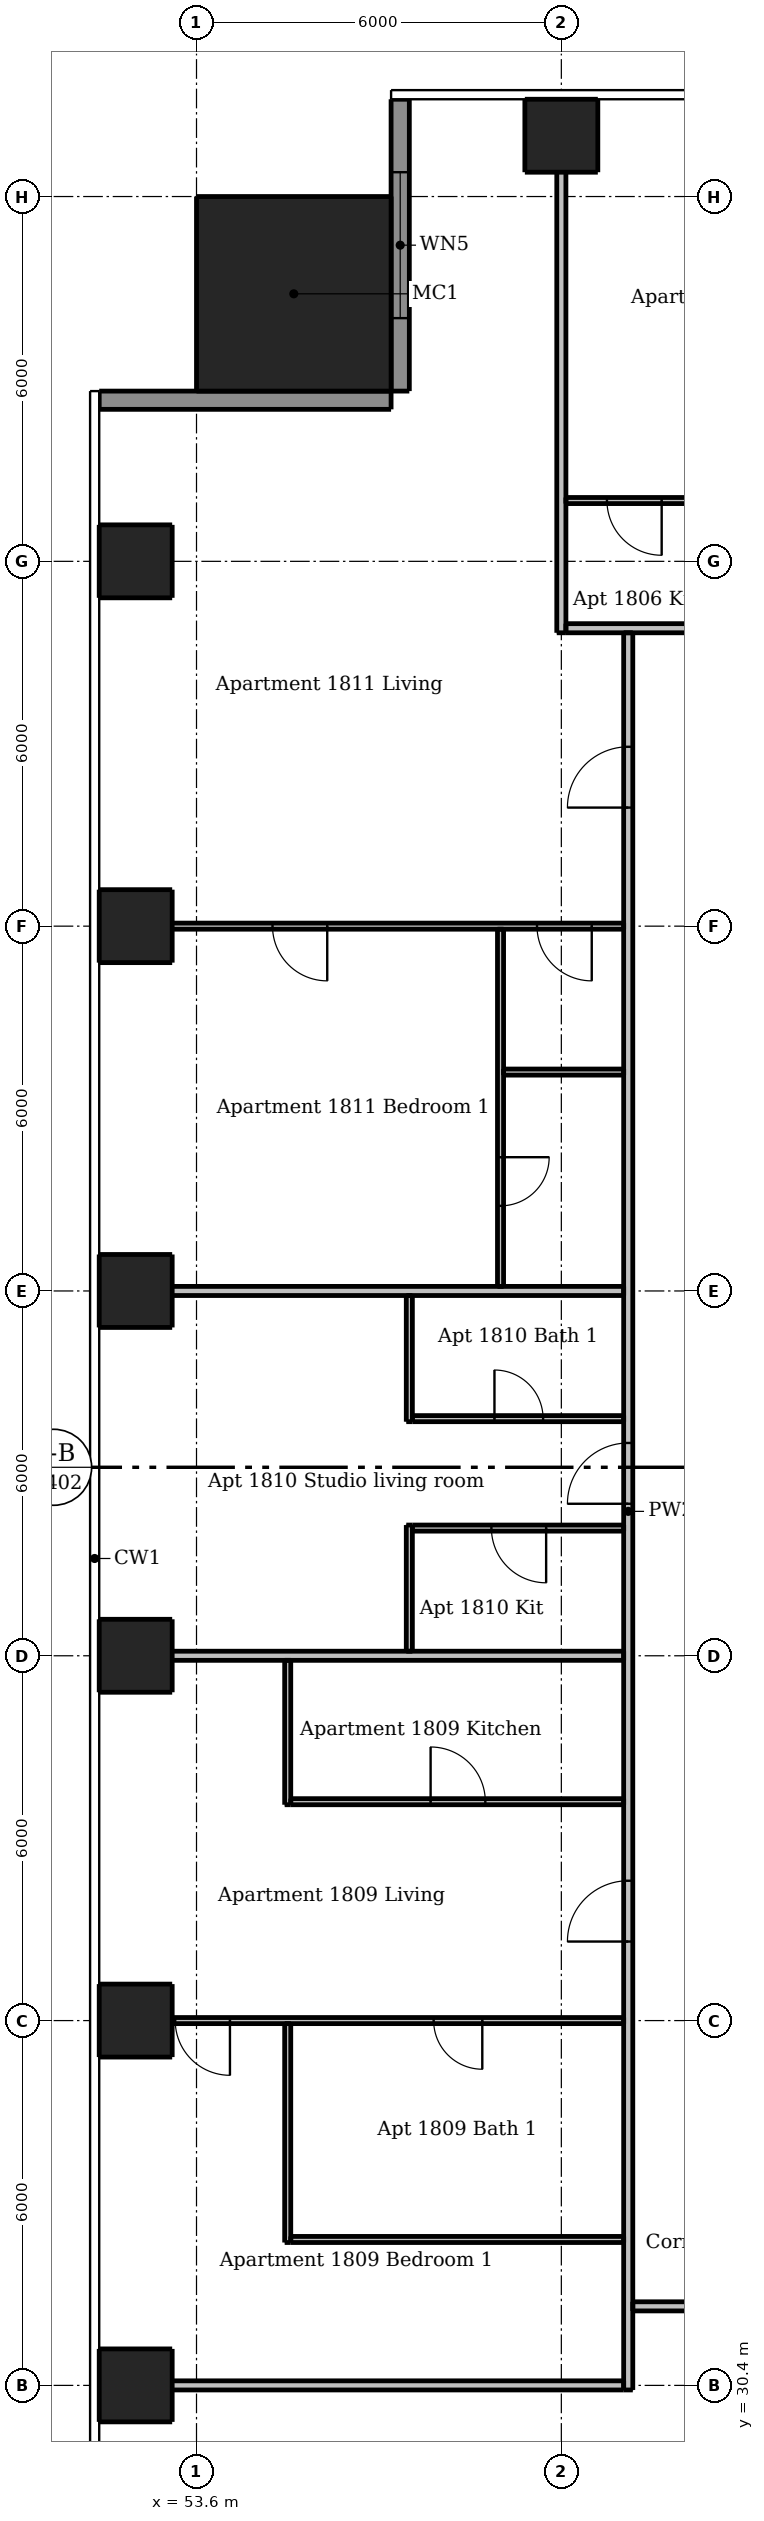
"""IFC4 building model, lengths in metres.
Left out: names, types, materials, properties, quantities, classifications, styles, units other than length and angle.
Written with IfcOpenShell. Run it as: python <this file> out.ifc"""

import sys

from ifc_helpers import new_model, si_unit, direction, frame, frame_2d, origin, origin_2d, place, context, subcontext, project, spatial, rectangle, extrude, element, fill, save


model = new_model("IFC4")
c1 = context("Model", 3, precision=1e-05, world=origin(), true_north=direction((0.0, 1.0)))
c2 = subcontext(c1, "Body", "Model", "MODEL_VIEW")
j1 = project(units=[si_unit("LENGTHUNIT", "METRE"), si_unit("PLANEANGLEUNIT", "RADIAN")], contexts=[c1])
p1 = place(None, origin())
s1 = spatial("IfcSite", under=j1, at=p1, CompositionType="ELEMENT")
p2 = place(p1, origin())
s2 = spatial("IfcBuilding", under=s1, at=p2, CompositionType="ELEMENT")
p3 = place(p2, frame((0.0, 0.0, 66.4)))
s3 = spatial("IfcBuildingStorey", under=s2, at=p3, CompositionType="ELEMENT", Elevation=66.4)
for number, where, z_axis, x_axis in (
    (1, (59.6, 67.4, 0.0), (0.0, 0.0, 1.0), (1.0, 0.0, 0.0)),
    (2, (52.6, 30.4, 0.0), (0.0, 0.0, 1.0), (1.0, 0.0, 0.0)),
    (3, (52.6, 36.4, 0.0), (0.0, 0.0, 1.0), (1.0, 0.0, 0.0)),
    (4, (52.6, 42.4, 0.0), (0.0, 0.0, 1.0), (1.0, 0.0, 0.0)),
    (5, (52.6, 48.4, 0.0), (0.0, 0.0, 1.0), (1.0, 0.0, 0.0)),
    (6, (52.6, 54.4, 0.0), (0.0, 0.0, 1.0), (1.0, 0.0, 0.0)),
    (7, (52.6, 60.4, 0.0), (0.0, 0.0, 1.0), (1.0, 0.0, 0.0)),
):
    element("IfcColumn", number, at=place(p3, frame(where, z_axis=z_axis, x_axis=x_axis)), inside=s3, PredefinedType="COLUMN", context=c2, shape_type="SweptSolid", body=[
        extrude(rectangle(XDim=1.2, YDim=1.2, at=origin_2d()), origin(), (0.0, 0.0, 1.0), 2.95),
    ])
p4 = place(p3, frame((55.2, 64.8, 0.0), z_axis=(0.0, 0.0, 1.0), x_axis=(1.0, 0.0, 0.0)))
e8 = element("IfcColumn", 8, at=p4, inside=s3, PredefinedType="COLUMN", context=c2, shape_type="SweptSolid", body=[
    extrude(rectangle(XDim=3.2, YDim=3.2, at=origin_2d()), origin(), (0.0, 0.0, 1.0), 3.3),
])
p5 = place(p3, frame((56.95, 68.0, 0.0), z_axis=(0.0, 0.0, 1.0), x_axis=(0.0, -1.0, 0.0)))
e9 = element("IfcWall", 9, at=p5, inside=s3, PredefinedType="SOLIDWALL", context=c2, shape_type="SweptSolid", body=[
    extrude(rectangle(XDim=4.8, YDim=0.3, at=frame_2d((2.4, 0.0))), origin(), (0.0, 0.0, 1.0), 2.95),
])
p6 = place(p5, frame((1.2, 0.0, 0.15)))
e10 = element("IfcOpeningElement", 10, at=p6, cuts=e9, PredefinedType="OPENING", context=c2, shape_type="SweptSolid", body=[
    extrude(rectangle(XDim=2.4, YDim=2.1, at=frame_2d((1.2, 1.05))), frame((0.0, 0.16, 0.0), z_axis=(0.0, -1.0, 0.0), x_axis=(1.0, 0.0, 0.0)), (0.0, 0.0, 1.0), 0.32),
])
p7 = place(p3, frame((56.8, 63.05, 0.0), z_axis=(0.0, 0.0, 1.0), x_axis=(-1.0, 0.0, 0.0)))
e11 = element("IfcWall", 11, at=p7, inside=s3, PredefinedType="SOLIDWALL", context=c2, shape_type="SweptSolid", body=[
    extrude(rectangle(XDim=4.8, YDim=0.3, at=frame_2d((2.4, 0.0))), origin(), (0.0, 0.0, 1.0), 2.95),
])
p8 = place(p3, frame((55.1, 32.75, 0.0), z_axis=(0.0, 0.0, 1.0), x_axis=(0.0, 1.0, 0.0)))
e12 = element("IfcWall", 12, at=p8, inside=s3, PredefinedType="PARTITIONING", context=c2, shape_type="SweptSolid", body=[
    extrude(rectangle(XDim=3.6, YDim=0.1, at=frame_2d((1.8, 0.0))), origin(), (0.0, 0.0, 1.0), 2.95),
])
p9 = place(p3, frame((55.1, 39.95, 0.0), z_axis=(0.0, 0.0, 1.0), x_axis=(0.0, 1.0, 0.0)))
e13 = element("IfcWall", 13, at=p9, inside=s3, PredefinedType="PARTITIONING", context=c2, shape_type="SweptSolid", body=[
    extrude(rectangle(XDim=2.375, YDim=0.1, at=frame_2d((1.188, 0.0))), origin(), (0.0, 0.0, 1.0), 2.95),
])
for number, where, z_axis, x_axis in (
    (14, (57.1, 42.475, 0.0), (0.0, 0.0, 1.0), (0.0, 1.0, 0.0)),
    (15, (57.1, 46.25, 0.0), (0.0, 0.0, 1.0), (0.0, 1.0, 0.0)),
):
    element("IfcWall", number, at=place(p3, frame(where, z_axis=z_axis, x_axis=x_axis)), inside=s3, PredefinedType="PARTITIONING", context=c2, shape_type="SweptSolid", body=[
        extrude(rectangle(XDim=2.075, YDim=0.1, at=frame_2d((1.038, 0.0))), origin(), (0.0, 0.0, 1.0), 2.95),
    ])
p10 = place(p3, frame((58.6, 54.35, 0.0), z_axis=(0.0, 0.0, 1.0), x_axis=(0.0, -1.0, 0.0)))
e16 = element("IfcWall", 16, at=p10, inside=s3, PredefinedType="PARTITIONING", context=c2, shape_type="SweptSolid", body=[
    extrude(rectangle(XDim=5.875, YDim=0.1, at=frame_2d((2.938, 0.0))), origin(), (0.0, 0.0, 1.0), 2.95),
])
p11 = place(p10, frame((3.75, 0.0, 0.0)))
e17 = element("IfcOpeningElement", 17, at=p11, cuts=e16, PredefinedType="OPENING", context=c2, shape_type="SweptSolid", body=[
    extrude(rectangle(XDim=0.8, YDim=2.1, at=frame_2d((0.4, 1.05))), frame((0.0, 0.06, 0.0), z_axis=(0.0, -1.0, 0.0), x_axis=(1.0, 0.0, 0.0)), (0.0, 0.0, 1.0), 0.12),
])
p12 = place(p3, frame((61.95, 61.4, 0.0), z_axis=(0.0, 0.0, 1.0), x_axis=(-1.0, 0.0, 0.0)))
e18 = element("IfcWall", 18, at=p12, inside=s3, PredefinedType="PARTITIONING", context=c2, shape_type="SweptSolid", body=[
    extrude(rectangle(XDim=2.275, YDim=0.1, at=frame_2d((1.137, 0.0))), origin(), (0.0, 0.0, 1.0), 2.95),
])
p13 = place(p12, frame((0.7, 0.0, 0.0)))
e19 = element("IfcOpeningElement", 19, at=p13, cuts=e18, PredefinedType="OPENING", context=c2, shape_type="SweptSolid", body=[
    extrude(rectangle(XDim=0.9, YDim=2.1, at=frame_2d((0.45, 1.05))), frame((0.0, 0.06, 0.0), z_axis=(0.0, -1.0, 0.0), x_axis=(1.0, 0.0, 0.0)), (0.0, 0.0, 1.0), 0.12),
])
p14 = place(p3, frame((60.625, 54.4, 0.0), z_axis=(0.0, 0.0, 1.0), x_axis=(-1.0, 0.0, 0.0)))
e20 = element("IfcWall", 20, at=p14, inside=s3, PredefinedType="PARTITIONING", context=c2, shape_type="SweptSolid", body=[
    extrude(rectangle(XDim=8.625, YDim=0.1, at=frame_2d((4.312, 0.0))), origin(), (0.0, 0.0, 1.0), 2.332),
])
p15 = place(p14, frame((0.525, 0.0, 0.0)))
e21 = element("IfcOpeningElement", 21, at=p15, cuts=e20, PredefinedType="OPENING", context=c2, shape_type="SweptSolid", body=[
    extrude(rectangle(XDim=0.9, YDim=2.1, at=frame_2d((0.45, 1.05))), frame((0.0, 0.06, 0.0), z_axis=(0.0, -1.0, 0.0), x_axis=(1.0, 0.0, 0.0)), (0.0, 0.0, 1.0), 0.12),
])
p16 = place(p14, frame((4.875, 0.0, 0.0)))
e22 = element("IfcOpeningElement", 22, at=p16, cuts=e20, PredefinedType="OPENING", context=c2, shape_type="SweptSolid", body=[
    extrude(rectangle(XDim=0.9, YDim=2.1, at=frame_2d((0.45, 1.05))), frame((0.0, 0.06, 0.0), z_axis=(0.0, -1.0, 0.0), x_axis=(1.0, 0.0, 0.0)), (0.0, 0.0, 1.0), 0.12),
])
p17 = place(p3, frame((58.65, 52.0, 0.0), z_axis=(0.0, 0.0, 1.0), x_axis=(1.0, 0.0, 0.0)))
e23 = element("IfcWall", 23, at=p17, inside=s3, PredefinedType="PARTITIONING", context=c2, shape_type="SweptSolid", body=[
    extrude(rectangle(XDim=1.975, YDim=0.1, at=frame_2d((0.988, 0.0))), origin(), (0.0, 0.0, 1.0), 2.95),
])
p18 = place(p3, frame((57.15, 46.3, 0.0), z_axis=(0.0, 0.0, 1.0), x_axis=(1.0, 0.0, 0.0)))
e24 = element("IfcWall", 24, at=p18, inside=s3, PredefinedType="PARTITIONING", context=c2, shape_type="SweptSolid", body=[
    extrude(rectangle(XDim=3.475, YDim=0.1, at=frame_2d((1.738, 0.0))), origin(), (0.0, 0.0, 1.0), 2.95),
])
p19 = place(p18, frame((1.35, 0.0, 0.0)))
e25 = element("IfcOpeningElement", 25, at=p19, cuts=e24, PredefinedType="OPENING", context=c2, shape_type="SweptSolid", body=[
    extrude(rectangle(XDim=0.8, YDim=2.1, at=frame_2d((0.4, 1.05))), frame((0.0, 0.06, 0.0), z_axis=(0.0, -1.0, 0.0), x_axis=(1.0, 0.0, 0.0)), (0.0, 0.0, 1.0), 0.12),
])
p20 = place(p3, frame((60.625, 44.5, 0.0), z_axis=(0.0, 0.0, 1.0), x_axis=(-1.0, 0.0, 0.0)))
e26 = element("IfcWall", 26, at=p20, inside=s3, PredefinedType="PARTITIONING", context=c2, shape_type="SweptSolid", body=[
    extrude(rectangle(XDim=3.475, YDim=0.1, at=frame_2d((1.738, 0.0))), origin(), (0.0, 0.0, 1.0), 2.95),
])
p21 = place(p20, frame((1.275, 0.0, 0.0)))
e27 = element("IfcOpeningElement", 27, at=p21, cuts=e26, PredefinedType="OPENING", context=c2, shape_type="SweptSolid", body=[
    extrude(rectangle(XDim=0.9, YDim=2.1, at=frame_2d((0.45, 1.05))), frame((0.0, 0.06, 0.0), z_axis=(0.0, -1.0, 0.0), x_axis=(1.0, 0.0, 0.0)), (0.0, 0.0, 1.0), 0.12),
])
p22 = place(p3, frame((55.15, 40.0, 0.0), z_axis=(0.0, 0.0, 1.0), x_axis=(1.0, 0.0, 0.0)))
e28 = element("IfcWall", 28, at=p22, inside=s3, PredefinedType="PARTITIONING", context=c2, shape_type="SweptSolid", body=[
    extrude(rectangle(XDim=5.475, YDim=0.1, at=frame_2d((2.738, 0.0))), origin(), (0.0, 0.0, 1.0), 2.95),
])
p23 = place(p22, frame((2.3, 0.0, 0.0)))
e29 = element("IfcOpeningElement", 29, at=p23, cuts=e28, PredefinedType="OPENING", context=c2, shape_type="SweptSolid", body=[
    extrude(rectangle(XDim=0.9, YDim=2.1, at=frame_2d((0.45, 1.05))), frame((0.0, 0.06, 0.0), z_axis=(0.0, -1.0, 0.0), x_axis=(1.0, 0.0, 0.0)), (0.0, 0.0, 1.0), 0.12),
])
p24 = place(p3, frame((60.625, 36.4, 0.0), z_axis=(0.0, 0.0, 1.0), x_axis=(-1.0, 0.0, 0.0)))
e30 = element("IfcWall", 30, at=p24, inside=s3, PredefinedType="PARTITIONING", context=c2, shape_type="SweptSolid", body=[
    extrude(rectangle(XDim=8.625, YDim=0.1, at=frame_2d((4.312, 0.0))), origin(), (0.0, 0.0, 1.0), 2.332),
])
p25 = place(p24, frame((6.475, 0.0, 0.0)))
e31 = element("IfcOpeningElement", 31, at=p25, cuts=e30, PredefinedType="OPENING", context=c2, shape_type="SweptSolid", body=[
    extrude(rectangle(XDim=0.9, YDim=2.1, at=frame_2d((0.45, 1.05))), frame((0.0, 0.06, 0.0), z_axis=(0.0, -1.0, 0.0), x_axis=(1.0, 0.0, 0.0)), (0.0, 0.0, 1.0), 0.12),
])
p26 = place(p24, frame((2.325, 0.0, 0.0)))
e32 = element("IfcOpeningElement", 32, at=p26, cuts=e30, PredefinedType="OPENING", context=c2, shape_type="SweptSolid", body=[
    extrude(rectangle(XDim=0.8, YDim=2.1, at=frame_2d((0.4, 1.05))), frame((0.0, 0.06, 0.0), z_axis=(0.0, -1.0, 0.0), x_axis=(1.0, 0.0, 0.0)), (0.0, 0.0, 1.0), 0.12),
])
p27 = place(p3, frame((55.15, 32.8, 0.0), z_axis=(0.0, 0.0, 1.0), x_axis=(1.0, 0.0, 0.0)))
e33 = element("IfcWall", 33, at=p27, inside=s3, PredefinedType="PARTITIONING", context=c2, shape_type="SweptSolid", body=[
    extrude(rectangle(XDim=5.475, YDim=0.1, at=frame_2d((2.738, 0.0))), origin(), (0.0, 0.0, 1.0), 2.95),
])
p28 = place(p3, frame((59.6, 59.225, 0.0), z_axis=(0.0, 0.0, 1.0), x_axis=(0.0, 1.0, 0.0)))
e34 = element("IfcWall", 34, at=p28, inside=s3, PredefinedType="PARTITIONING", context=c2, shape_type="SweptSolid", body=[
    extrude(rectangle(XDim=8.775, YDim=0.15, at=frame_2d((4.387, 0.0))), origin(), (0.0, 0.0, 1.0), 2.332),
])
p29 = place(p3, frame((60.7, 30.325, 0.0), z_axis=(0.0, 0.0, 1.0), x_axis=(0.0, 1.0, 0.0)))
e35 = element("IfcWall", 35, at=p29, inside=s3, PredefinedType="PARTITIONING", context=c2, shape_type="SweptSolid", body=[
    extrude(rectangle(XDim=28.9, YDim=0.15, at=frame_2d((14.45, 0.0))), origin(), (0.0, 0.0, 1.0), 2.95),
])
p30 = place(p29, frame((7.375, 0.0, 0.0)))
e36 = element("IfcOpeningElement", 36, at=p30, cuts=e35, PredefinedType="OPENING", context=c2, shape_type="SweptSolid", body=[
    extrude(rectangle(XDim=1.0, YDim=2.1, at=frame_2d((0.5, 1.05))), frame((0.0, 0.085, 0.0), z_axis=(0.0, -1.0, 0.0), x_axis=(1.0, 0.0, 0.0)), (0.0, 0.0, 1.0), 0.17),
])
p31 = place(p29, frame((14.575, 0.0, 0.0)))
e37 = element("IfcOpeningElement", 37, at=p31, cuts=e35, PredefinedType="OPENING", context=c2, shape_type="SweptSolid", body=[
    extrude(rectangle(XDim=1.0, YDim=2.1, at=frame_2d((0.5, 1.05))), frame((0.0, 0.085, 0.0), z_axis=(0.0, -1.0, 0.0), x_axis=(1.0, 0.0, 0.0)), (0.0, 0.0, 1.0), 0.17),
])
p32 = place(p29, frame((26.025, 0.0, 0.0)))
e38 = element("IfcOpeningElement", 38, at=p32, cuts=e35, PredefinedType="OPENING", context=c2, shape_type="SweptSolid", body=[
    extrude(rectangle(XDim=1.0, YDim=2.1, at=frame_2d((0.5, 1.05))), frame((0.0, 0.085, 0.0), z_axis=(0.0, -1.0, 0.0), x_axis=(1.0, 0.0, 0.0)), (0.0, 0.0, 1.0), 0.17),
])
p33 = place(p3, frame((59.675, 59.3, 0.0), z_axis=(0.0, 0.0, 1.0), x_axis=(1.0, 0.0, 0.0)))
e39 = element("IfcWall", 39, at=p33, inside=s3, PredefinedType="PARTITIONING", context=c2, shape_type="SweptSolid", body=[
    extrude(rectangle(XDim=28.55, YDim=0.15, at=frame_2d((14.275, 0.0))), origin(), (0.0, 0.0, 1.0), 2.95),
])
p34 = place(p33, frame((3.625, 0.0, 0.0)))
e40 = element("IfcOpeningElement", 40, at=p34, cuts=e39, PredefinedType="OPENING", context=c2, shape_type="SweptSolid", body=[
    extrude(rectangle(XDim=1.0, YDim=2.1, at=frame_2d((0.5, 1.05))), frame((0.0, 0.085, 0.0), z_axis=(0.0, -1.0, 0.0), x_axis=(1.0, 0.0, 0.0)), (0.0, 0.0, 1.0), 0.17),
])
p35 = place(p33, frame((14.425, 0.0, 0.0)))
e41 = element("IfcOpeningElement", 41, at=p35, cuts=e39, PredefinedType="OPENING", context=c2, shape_type="SweptSolid", body=[
    extrude(rectangle(XDim=1.0, YDim=2.1, at=frame_2d((0.5, 1.05))), frame((0.0, 0.085, 0.0), z_axis=(0.0, -1.0, 0.0), x_axis=(1.0, 0.0, 0.0)), (0.0, 0.0, 1.0), 0.17),
])
p36 = place(p33, frame((25.775, 0.0, 0.0)))
e42 = element("IfcOpeningElement", 42, at=p36, cuts=e39, PredefinedType="OPENING", context=c2, shape_type="SweptSolid", body=[
    extrude(rectangle(XDim=1.0, YDim=2.1, at=frame_2d((0.5, 1.05))), frame((0.0, 0.085, 0.0), z_axis=(0.0, -1.0, 0.0), x_axis=(1.0, 0.0, 0.0)), (0.0, 0.0, 1.0), 0.17),
])
for number, where, z_axis, x_axis in (
    (43, (52.0, 48.4, 0.0), (0.0, 0.0, 1.0), (1.0, 0.0, 0.0)),
    (44, (52.0, 42.4, 0.0), (0.0, 0.0, 1.0), (1.0, 0.0, 0.0)),
):
    element("IfcWall", number, at=place(p3, frame(where, z_axis=z_axis, x_axis=x_axis)), inside=s3, PredefinedType="PARTITIONING", context=c2, shape_type="SweptSolid", body=[
        extrude(rectangle(XDim=8.625, YDim=0.15, at=frame_2d((4.312, 0.0))), origin(), (0.0, 0.0, 1.0), 2.332),
    ])
p37 = place(p3, frame((89.525, 31.7, 0.0), z_axis=(0.0, 0.0, 1.0), x_axis=(-1.0, 0.0, 0.0)))
e45 = element("IfcWall", 45, at=p37, inside=s3, PredefinedType="PARTITIONING", context=c2, shape_type="SweptSolid", body=[
    extrude(rectangle(XDim=28.75, YDim=0.15, at=frame_2d((14.375, 0.0))), origin(), (0.0, 0.0, 1.0), 2.95),
])
p38 = place(p37, frame((24.625, 0.0, 0.0)))
e46 = element("IfcOpeningElement", 46, at=p38, cuts=e45, PredefinedType="OPENING", context=c2, shape_type="SweptSolid", body=[
    extrude(rectangle(XDim=1.0, YDim=2.1, at=frame_2d((0.5, 1.05))), frame((0.0, 0.085, 0.0), z_axis=(0.0, -1.0, 0.0), x_axis=(1.0, 0.0, 0.0)), (0.0, 0.0, 1.0), 0.17),
])
p39 = place(p37, frame((8.425, 0.0, 0.0)))
e47 = element("IfcOpeningElement", 47, at=p39, cuts=e45, PredefinedType="OPENING", context=c2, shape_type="SweptSolid", body=[
    extrude(rectangle(XDim=1.0, YDim=2.1, at=frame_2d((0.5, 1.05))), frame((0.0, 0.085, 0.0), z_axis=(0.0, -1.0, 0.0), x_axis=(1.0, 0.0, 0.0)), (0.0, 0.0, 1.0), 0.17),
])
p40 = place(p3, frame((52.0, 30.4, 0.0), z_axis=(0.0, 0.0, 1.0), x_axis=(1.0, 0.0, 0.0)))
e48 = element("IfcWall", 48, at=p40, inside=s3, PredefinedType="PARTITIONING", context=c2, shape_type="SweptSolid", body=[
    extrude(rectangle(XDim=8.625, YDim=0.15, at=frame_2d((4.312, 0.0))), origin(), (0.0, 0.0, 1.0), 2.332),
])
p41 = place(p6, origin())
e49 = element("IfcWindow", 49, at=p41, inside=s3, PartitioningType="DOUBLE_PANEL_VERTICAL", PredefinedType="WINDOW", context=c2, shape_type="SweptSolid", body=[
    extrude(rectangle(XDim=2.4, YDim=2.1, at=frame_2d((1.2, 1.05))), frame((0.0, 0.03, 0.0), z_axis=(0.0, -1.0, 0.0), x_axis=(1.0, 0.0, 0.0)), (0.0, 0.0, 1.0), 0.06),
])
fill(e10, e49)
p42 = place(p13, origin())
e50 = element("IfcDoor", 50, at=p42, inside=s3, OperationType="SINGLE_SWING_LEFT", PredefinedType="DOOR", context=c2, shape_type="SweptSolid", body=[
    extrude(rectangle(XDim=0.9, YDim=2.1, at=frame_2d((0.45, 1.05))), frame((0.0, 0.025, 0.0), z_axis=(0.0, -1.0, 0.0), x_axis=(1.0, 0.0, 0.0)), (0.0, 0.0, 1.0), 0.05),
])
fill(e19, e50)
p43 = place(p30, origin())
e51 = element("IfcDoor", 51, at=p43, inside=s3, OperationType="SINGLE_SWING_LEFT", PredefinedType="DOOR", context=c2, shape_type="SweptSolid", body=[
    extrude(rectangle(XDim=1.0, YDim=2.1, at=frame_2d((0.5, 1.05))), frame((0.0, 0.025, 0.0), z_axis=(0.0, -1.0, 0.0), x_axis=(1.0, 0.0, 0.0)), (0.0, 0.0, 1.0), 0.05),
])
fill(e36, e51)
p44 = place(p23, origin())
e52 = element("IfcDoor", 52, at=p44, inside=s3, OperationType="SINGLE_SWING_LEFT", PredefinedType="DOOR", context=c2, shape_type="SweptSolid", body=[
    extrude(rectangle(XDim=0.9, YDim=2.1, at=frame_2d((0.45, 1.05))), frame((0.0, 0.025, 0.0), z_axis=(0.0, -1.0, 0.0), x_axis=(1.0, 0.0, 0.0)), (0.0, 0.0, 1.0), 0.05),
])
fill(e29, e52)
p45 = place(p25, origin())
e53 = element("IfcDoor", 53, at=p45, inside=s3, OperationType="SINGLE_SWING_LEFT", PredefinedType="DOOR", context=c2, shape_type="SweptSolid", body=[
    extrude(rectangle(XDim=0.9, YDim=2.1, at=frame_2d((0.45, 1.05))), frame((0.0, 0.025, 0.0), z_axis=(0.0, -1.0, 0.0), x_axis=(1.0, 0.0, 0.0)), (0.0, 0.0, 1.0), 0.05),
])
fill(e31, e53)
p46 = place(p26, origin())
e54 = element("IfcDoor", 54, at=p46, inside=s3, OperationType="SINGLE_SWING_LEFT", PredefinedType="DOOR", context=c2, shape_type="SweptSolid", body=[
    extrude(rectangle(XDim=0.8, YDim=2.1, at=frame_2d((0.4, 1.05))), frame((0.0, 0.025, 0.0), z_axis=(0.0, -1.0, 0.0), x_axis=(1.0, 0.0, 0.0)), (0.0, 0.0, 1.0), 0.05),
])
fill(e32, e54)
p47 = place(p31, origin())
e55 = element("IfcDoor", 55, at=p47, inside=s3, OperationType="SINGLE_SWING_LEFT", PredefinedType="DOOR", context=c2, shape_type="SweptSolid", body=[
    extrude(rectangle(XDim=1.0, YDim=2.1, at=frame_2d((0.5, 1.05))), frame((0.0, 0.025, 0.0), z_axis=(0.0, -1.0, 0.0), x_axis=(1.0, 0.0, 0.0)), (0.0, 0.0, 1.0), 0.05),
])
fill(e37, e55)
p48 = place(p21, origin())
e56 = element("IfcDoor", 56, at=p48, inside=s3, OperationType="SINGLE_SWING_LEFT", PredefinedType="DOOR", context=c2, shape_type="SweptSolid", body=[
    extrude(rectangle(XDim=0.9, YDim=2.1, at=frame_2d((0.45, 1.05))), frame((0.0, 0.025, 0.0), z_axis=(0.0, -1.0, 0.0), x_axis=(1.0, 0.0, 0.0)), (0.0, 0.0, 1.0), 0.05),
])
fill(e27, e56)
p49 = place(p19, origin())
e57 = element("IfcDoor", 57, at=p49, inside=s3, OperationType="SINGLE_SWING_LEFT", PredefinedType="DOOR", context=c2, shape_type="SweptSolid", body=[
    extrude(rectangle(XDim=0.8, YDim=2.1, at=frame_2d((0.4, 1.05))), frame((0.0, 0.025, 0.0), z_axis=(0.0, -1.0, 0.0), x_axis=(1.0, 0.0, 0.0)), (0.0, 0.0, 1.0), 0.05),
])
fill(e25, e57)
p50 = place(p32, origin())
e58 = element("IfcDoor", 58, at=p50, inside=s3, OperationType="SINGLE_SWING_LEFT", PredefinedType="DOOR", context=c2, shape_type="SweptSolid", body=[
    extrude(rectangle(XDim=1.0, YDim=2.1, at=frame_2d((0.5, 1.05))), frame((0.0, 0.025, 0.0), z_axis=(0.0, -1.0, 0.0), x_axis=(1.0, 0.0, 0.0)), (0.0, 0.0, 1.0), 0.05),
])
fill(e38, e58)
p51 = place(p15, origin())
e59 = element("IfcDoor", 59, at=p51, inside=s3, OperationType="SINGLE_SWING_LEFT", PredefinedType="DOOR", context=c2, shape_type="SweptSolid", body=[
    extrude(rectangle(XDim=0.9, YDim=2.1, at=frame_2d((0.45, 1.05))), frame((0.0, 0.025, 0.0), z_axis=(0.0, -1.0, 0.0), x_axis=(1.0, 0.0, 0.0)), (0.0, 0.0, 1.0), 0.05),
])
fill(e21, e59)
p52 = place(p16, origin())
e60 = element("IfcDoor", 60, at=p52, inside=s3, OperationType="SINGLE_SWING_LEFT", PredefinedType="DOOR", context=c2, shape_type="SweptSolid", body=[
    extrude(rectangle(XDim=0.9, YDim=2.1, at=frame_2d((0.45, 1.05))), frame((0.0, 0.025, 0.0), z_axis=(0.0, -1.0, 0.0), x_axis=(1.0, 0.0, 0.0)), (0.0, 0.0, 1.0), 0.05),
])
fill(e22, e60)
p53 = place(p11, origin())
e61 = element("IfcDoor", 61, at=p53, inside=s3, OperationType="SINGLE_SWING_LEFT", PredefinedType="DOOR", context=c2, shape_type="SweptSolid", body=[
    extrude(rectangle(XDim=0.8, YDim=2.1, at=frame_2d((0.4, 1.05))), frame((0.0, 0.025, 0.0), z_axis=(0.0, -1.0, 0.0), x_axis=(1.0, 0.0, 0.0)), (0.0, 0.0, 1.0), 0.05),
])
fill(e17, e61)
save(model, sys.argv[1])
